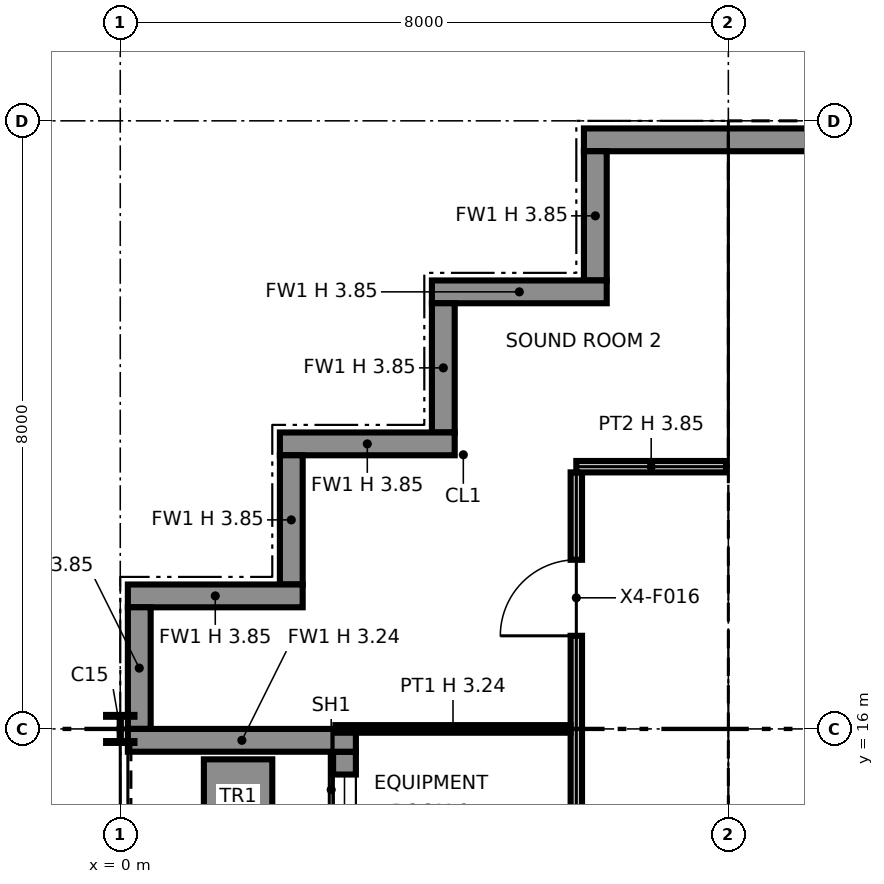
"""IFC4 building model, lengths in metres.
Left out: names, types, materials, properties, quantities, classifications, styles, units other than length and angle.
Written with IfcOpenShell. Run it as: python <this file> out.ifc"""

import sys

from ifc_helpers import new_model, si_unit, direction, frame, frame_2d, origin, origin_2d, place, context, subcontext, project, spatial, polyline, rectangle, i_section, outline, extrude, element, fill, save


model = new_model("IFC4")
c1 = context("Model", 3, precision=1e-05, world=origin(), true_north=direction((0.0, 1.0)))
c2 = subcontext(c1, "Body", "Model", "MODEL_VIEW")
j1 = project(units=[si_unit("LENGTHUNIT", "METRE"), si_unit("PLANEANGLEUNIT", "RADIAN")], contexts=[c1])
p1 = place(None, origin())
s1 = spatial("IfcSite", under=j1, at=p1, CompositionType="ELEMENT")
p2 = place(p1, origin())
s2 = spatial("IfcBuilding", under=s1, at=p2, CompositionType="ELEMENT")
p3 = place(p2, frame((0.0, 0.0, 279.0)))
s3 = spatial("IfcBuildingStorey", under=s2, at=p3, CompositionType="ELEMENT", Elevation=279.0)
p4 = place(p3, frame((0.0, 16.0, 0.0), z_axis=(0.0, 0.0, 1.0), x_axis=(1.0, 0.0, 0.0)))
e1 = element("IfcColumn", 1, at=p4, inside=s3, PredefinedType="COLUMN", context=c2, shape_type="SweptSolid", body=[
    extrude(i_section(OverallWidth=0.373, OverallDepth=0.368, WebThickness=0.015, FlangeThickness=0.024, at=origin_2d()), origin(), (0.0, 0.0, 1.0), 3.85),
])
p5 = place(p3, frame((8.0, 16.0, 0.0), z_axis=(0.0, 0.0, 1.0), x_axis=(1.0, 0.0, 0.0)))
e2 = element("IfcColumn", 2, at=p5, inside=s3, PredefinedType="COLUMN", context=c2, shape_type="SweptSolid", body=[
    extrude(i_section(OverallWidth=0.257, OverallDepth=0.363, WebThickness=0.013, FlangeThickness=0.022, at=origin_2d()), origin(), (0.0, 0.0, 1.0), 3.85),
])
p6 = place(p3, frame((8.0, 24.0, 0.0), z_axis=(0.0, 0.0, 1.0), x_axis=(1.0, 0.0, 0.0)))
e3 = element("IfcColumn", 3, at=p6, inside=s3, PredefinedType="COLUMN", context=c2, shape_type="SweptSolid", body=[
    extrude(i_section(OverallWidth=0.399, OverallDepth=0.386, WebThickness=0.021, FlangeThickness=0.033, at=origin_2d()), origin(), (0.0, 0.0, 1.0), 3.85),
])
p7 = place(p3, frame((32.0, 23.75, 0.0), z_axis=(0.0, 0.0, 1.0), x_axis=(-1.0, 0.0, 0.0)))
e4 = element("IfcWall", 4, at=p7, inside=s3, PredefinedType="SOLIDWALL", context=c2, shape_type="SweptSolid", body=[
    extrude(rectangle(XDim=25.9, YDim=0.3, at=frame_2d((12.95, 0.0))), origin(), (0.0, 0.0, 1.0), 3.85),
])
p8 = place(p3, frame((6.25, 23.6, 0.0), z_axis=(0.0, 0.0, 1.0), x_axis=(0.0, -1.0, 0.0)))
e5 = element("IfcWall", 5, at=p8, inside=s3, PredefinedType="SOLIDWALL", context=c2, shape_type="SweptSolid", body=[
    extrude(rectangle(XDim=1.7, YDim=0.3, at=frame_2d((0.85, 0.0))), origin(), (0.0, 0.0, 1.0), 3.85),
])
p9 = place(p3, frame((6.4, 21.75, 0.0), z_axis=(0.0, 0.0, 1.0), x_axis=(-1.0, 0.0, 0.0)))
e6 = element("IfcWall", 6, at=p9, inside=s3, PredefinedType="SOLIDWALL", context=c2, shape_type="SweptSolid", body=[
    extrude(rectangle(XDim=2.3, YDim=0.3, at=frame_2d((1.15, 0.0))), origin(), (0.0, 0.0, 1.0), 3.85),
])
p10 = place(p3, frame((4.25, 21.6, 0.0), z_axis=(0.0, 0.0, 1.0), x_axis=(0.0, -1.0, 0.0)))
e7 = element("IfcWall", 7, at=p10, inside=s3, PredefinedType="SOLIDWALL", context=c2, shape_type="SweptSolid", body=[
    extrude(rectangle(XDim=1.7, YDim=0.3, at=frame_2d((0.85, 0.0))), origin(), (0.0, 0.0, 1.0), 3.85),
])
p11 = place(p3, frame((4.4, 19.75, 0.0), z_axis=(0.0, 0.0, 1.0), x_axis=(-1.0, 0.0, 0.0)))
e8 = element("IfcWall", 8, at=p11, inside=s3, PredefinedType="SOLIDWALL", context=c2, shape_type="SweptSolid", body=[
    extrude(rectangle(XDim=2.3, YDim=0.3, at=frame_2d((1.15, 0.0))), origin(), (0.0, 0.0, 1.0), 3.85),
])
p12 = place(p3, frame((2.25, 19.6, 0.0), z_axis=(0.0, 0.0, 1.0), x_axis=(0.0, -1.0, 0.0)))
e9 = element("IfcWall", 9, at=p12, inside=s3, PredefinedType="SOLIDWALL", context=c2, shape_type="SweptSolid", body=[
    extrude(rectangle(XDim=1.7, YDim=0.3, at=frame_2d((0.85, 0.0))), origin(), (0.0, 0.0, 1.0), 3.85),
])
p13 = place(p3, frame((2.4, 17.75, 0.0), z_axis=(0.0, 0.0, 1.0), x_axis=(-1.0, 0.0, 0.0)))
e10 = element("IfcWall", 10, at=p13, inside=s3, PredefinedType="SOLIDWALL", context=c2, shape_type="SweptSolid", body=[
    extrude(rectangle(XDim=2.3, YDim=0.3, at=frame_2d((1.15, 0.0))), origin(), (0.0, 0.0, 1.0), 3.85),
])
p14 = place(p3, frame((0.25, 17.6, 0.0), z_axis=(0.0, 0.0, 1.0), x_axis=(0.0, -1.0, 0.0)))
e11 = element("IfcWall", 11, at=p14, inside=s3, PredefinedType="SOLIDWALL", context=c2, shape_type="SweptSolid", body=[
    extrude(rectangle(XDim=1.6, YDim=0.3, at=frame_2d((0.8, 0.0))), origin(), (0.0, 0.0, 1.0), 3.85),
])
p15 = place(p3, frame((2.95, 15.7, 0.0), z_axis=(0.0, 0.0, 1.0), x_axis=(0.0, -1.0, 0.0)))
e12 = element("IfcWall", 12, at=p15, inside=s3, PredefinedType="SOLIDWALL", context=c2, shape_type="SweptSolid", body=[
    extrude(rectangle(XDim=7.4, YDim=0.3, at=frame_2d((3.7, 0.0))), origin(), (0.0, 0.0, 1.0), 3.85),
])
p16 = place(p15, frame((0.3, 0.0, 0.9)))
e13 = element("IfcOpeningElement", 13, at=p16, cuts=e12, PredefinedType="OPENING", context=c2, shape_type="SweptSolid", body=[
    extrude(rectangle(XDim=2.8, YDim=2.2, at=frame_2d((1.4, 1.1))), frame((0.0, 0.16, 0.0), z_axis=(0.0, -1.0, 0.0), x_axis=(1.0, 0.0, 0.0)), (0.0, 0.0, 1.0), 0.32),
])
p17 = place(p15, frame((4.7, 0.0, 0.0)))
e14 = element("IfcOpeningElement", 14, at=p17, cuts=e12, PredefinedType="OPENING", context=c2, shape_type="SweptSolid", body=[
    extrude(rectangle(XDim=2.0, YDim=2.4, at=frame_2d((1.0, 1.2))), frame((0.0, 0.16, 0.0), z_axis=(0.0, -1.0, 0.0), x_axis=(1.0, 0.0, 0.0)), (0.0, 0.0, 1.0), 0.32),
])
p18 = place(p3, frame((0.1, 15.85, 0.0), z_axis=(0.0, 0.0, 1.0), x_axis=(1.0, 0.0, 0.0)))
e15 = element("IfcWall", 15, at=p18, inside=s3, PredefinedType="SOLIDWALL", context=c2, shape_type="SweptSolid", body=[
    extrude(rectangle(XDim=3.0, YDim=0.3, at=frame_2d((1.5, 0.0))), origin(), (0.0, 0.0, 1.0), 3.237),
])
p19 = place(p3, frame((1.55, 15.6, 0.0), z_axis=(0.0, 0.0, 1.0), x_axis=(0.0, -1.0, 0.0)))
e16 = element("IfcWall", 16, at=p19, inside=s3, PredefinedType="SOLIDWALL", context=c2, shape_type="SweptSolid", body=[
    extrude(rectangle(XDim=3.2, YDim=0.9, at=frame_2d((1.6, 0.0))), origin(), (0.0, 0.0, 1.0), 0.6),
])
p20 = place(p3, frame((8.75, 8.85, 0.0), z_axis=(0.0, 0.0, 1.0), x_axis=(0.0, 1.0, 0.0)))
e17 = element("IfcWall", 17, at=p20, inside=s3, PredefinedType="PARTITIONING", context=c2, shape_type="SweptSolid", body=[
    extrude(outline(polyline([(0.0, 0.0), (14.3, 0.0), (14.3, 3.85), (10.225, 3.85), (10.224, 3.44), (10.076, 3.44), (10.075, 3.85), (7.238, 3.85), (7.237, 3.318), (7.063, 3.318), (7.062, 3.85), (0.0, 3.85), (0.0, 0.0)])), frame((0.0, 0.1, 0.0), z_axis=(0.0, -1.0, 0.0), x_axis=(1.0, 0.0, 0.0)), (0.0, 0.0, 1.0), 0.2),
])
p21 = place(p20, frame((8.3, 0.0, 0.0)))
e18 = element("IfcOpeningElement", 18, at=p21, cuts=e17, PredefinedType="OPENING", context=c2, shape_type="SweptSolid", body=[
    extrude(rectangle(XDim=1.8, YDim=2.1, at=frame_2d((0.9, 1.05))), frame((0.0, 0.11, 0.0), z_axis=(0.0, -1.0, 0.0), x_axis=(1.0, 0.0, 0.0)), (0.0, 0.0, 1.0), 0.22),
])
p22 = place(p3, frame((8.65, 23.25, 0.0), z_axis=(0.0, 0.0, 1.0), x_axis=(1.0, 0.0, 0.0)))
e19 = element("IfcWall", 19, at=p22, inside=s3, PredefinedType="PARTITIONING", context=c2, shape_type="SweptSolid", body=[
    extrude(outline(polyline([(0.0, 0.0), (14.7, 0.0), (14.7, 3.85), (7.438, 3.85), (7.437, 3.318), (7.263, 3.318), (7.262, 3.85), (0.0, 3.85), (0.0, 0.0)])), frame((0.0, 0.1, 0.0), z_axis=(0.0, -1.0, 0.0), x_axis=(1.0, 0.0, 0.0)), (0.0, 0.0, 1.0), 0.2),
])
p23 = place(p3, frame((8.85, 16.0, 0.0), z_axis=(0.0, 0.0, 1.0), x_axis=(1.0, 0.0, 0.0)))
e20 = element("IfcWall", 20, at=p23, inside=s3, PredefinedType="PARTITIONING", context=c2, shape_type="SweptSolid", body=[
    extrude(rectangle(XDim=6.958, YDim=0.6, at=frame_2d((3.479, 0.0))), origin(), (0.0, 0.0, 1.0), 3.318),
])
p24 = place(p3, frame((8.85, 19.9, 0.0), z_axis=(0.0, 0.0, 1.0), x_axis=(1.0, 0.0, 0.0)))
e21 = element("IfcWall", 21, at=p24, inside=s3, PredefinedType="PARTITIONING", context=c2, shape_type="SweptSolid", body=[
    extrude(outline(polyline([(0.0, 0.0), (14.3, 0.0), (14.3, 3.85), (7.238, 3.85), (7.237, 3.318), (7.063, 3.318), (7.062, 3.85), (0.0, 3.85), (0.0, 0.0)])), frame((0.0, 0.1, 0.0), z_axis=(0.0, -1.0, 0.0), x_axis=(1.0, 0.0, 0.0)), (0.0, 0.0, 1.0), 0.2),
])
p25 = place(p24, frame((2.125, 0.0, 0.0)))
e22 = element("IfcOpeningElement", 22, at=p25, cuts=e21, PredefinedType="OPENING", context=c2, shape_type="SweptSolid", body=[
    extrude(rectangle(XDim=0.9, YDim=2.1, at=frame_2d((0.45, 1.05))), frame((0.0, 0.11, 0.0), z_axis=(0.0, -1.0, 0.0), x_axis=(1.0, 0.0, 0.0)), (0.0, 0.0, 1.0), 0.22),
])
p26 = place(p24, frame((5.65, 0.0, 0.0)))
e23 = element("IfcOpeningElement", 23, at=p26, cuts=e21, PredefinedType="OPENING", context=c2, shape_type="SweptSolid", body=[
    extrude(rectangle(XDim=1.1, YDim=2.1, at=frame_2d((0.55, 1.05))), frame((0.0, 0.11, 0.0), z_axis=(0.0, -1.0, 0.0), x_axis=(1.0, 0.0, 0.0)), (0.0, 0.0, 1.0), 0.22),
])
p27 = place(p24, frame((7.95, 0.0, 0.0)))
e24 = element("IfcOpeningElement", 24, at=p27, cuts=e21, PredefinedType="OPENING", context=c2, shape_type="SweptSolid", body=[
    extrude(rectangle(XDim=1.1, YDim=2.1, at=frame_2d((0.55, 1.05))), frame((0.0, 0.11, 0.0), z_axis=(0.0, -1.0, 0.0), x_axis=(1.0, 0.0, 0.0)), (0.0, 0.0, 1.0), 0.22),
])
p28 = place(p24, frame((10.25, 0.0, 0.0)))
e25 = element("IfcOpeningElement", 25, at=p28, cuts=e21, PredefinedType="OPENING", context=c2, shape_type="SweptSolid", body=[
    extrude(rectangle(XDim=1.1, YDim=2.1, at=frame_2d((0.55, 1.05))), frame((0.0, 0.11, 0.0), z_axis=(0.0, -1.0, 0.0), x_axis=(1.0, 0.0, 0.0)), (0.0, 0.0, 1.0), 0.22),
])
p29 = place(p24, frame((12.625, 0.0, 0.0)))
e26 = element("IfcOpeningElement", 26, at=p29, cuts=e21, PredefinedType="OPENING", context=c2, shape_type="SweptSolid", body=[
    extrude(rectangle(XDim=1.1, YDim=2.1, at=frame_2d((0.55, 1.05))), frame((0.0, 0.11, 0.0), z_axis=(0.0, -1.0, 0.0), x_axis=(1.0, 0.0, 0.0)), (0.0, 0.0, 1.0), 0.22),
])
p30 = place(p3, frame((6.0, 6.0, 0.0), z_axis=(0.0, 0.0, 1.0), x_axis=(0.0, 1.0, 0.0)))
e27 = element("IfcWall", 27, at=p30, inside=s3, PredefinedType="PARTITIONING", context=c2, shape_type="SweptSolid", body=[
    extrude(outline(polyline([(0.0, 0.0), (13.375, 0.0), (13.375, 3.85), (10.3, 3.85), (10.298, 3.238), (9.702, 3.238), (9.7, 3.85), (6.3, 3.85), (6.298, 3.238), (5.702, 3.238), (5.7, 3.85), (2.3, 3.85), (2.298, 3.238), (1.702, 3.238), (1.7, 3.85), (0.0, 3.85), (0.0, 0.0)])), frame((0.0, 0.075, 0.0), z_axis=(0.0, -1.0, 0.0), x_axis=(1.0, 0.0, 0.0)), (0.0, 0.0, 1.0), 0.15),
])
p31 = place(p30, frame((0.5, 0.0, 0.0)))
e28 = element("IfcOpeningElement", 28, at=p31, cuts=e27, PredefinedType="OPENING", context=c2, shape_type="SweptSolid", body=[
    extrude(rectangle(XDim=1.0, YDim=2.1, at=frame_2d((0.5, 1.05))), frame((0.0, 0.085, 0.0), z_axis=(0.0, -1.0, 0.0), x_axis=(1.0, 0.0, 0.0)), (0.0, 0.0, 1.0), 0.17),
])
p32 = place(p30, frame((3.5, 0.0, 0.0)))
e29 = element("IfcOpeningElement", 29, at=p32, cuts=e27, PredefinedType="OPENING", context=c2, shape_type="SweptSolid", body=[
    extrude(rectangle(XDim=1.0, YDim=2.1, at=frame_2d((0.5, 1.05))), frame((0.0, 0.085, 0.0), z_axis=(0.0, -1.0, 0.0), x_axis=(1.0, 0.0, 0.0)), (0.0, 0.0, 1.0), 0.17),
])
p33 = place(p30, frame((7.5, 0.0, 0.0)))
e30 = element("IfcOpeningElement", 30, at=p33, cuts=e27, PredefinedType="OPENING", context=c2, shape_type="SweptSolid", body=[
    extrude(rectangle(XDim=1.0, YDim=2.1, at=frame_2d((0.5, 1.05))), frame((0.0, 0.085, 0.0), z_axis=(0.0, -1.0, 0.0), x_axis=(1.0, 0.0, 0.0)), (0.0, 0.0, 1.0), 0.17),
])
p34 = place(p30, frame((11.225, 0.0, 0.0)))
e31 = element("IfcOpeningElement", 31, at=p34, cuts=e27, PredefinedType="OPENING", context=c2, shape_type="SweptSolid", body=[
    extrude(rectangle(XDim=1.0, YDim=2.1, at=frame_2d((0.5, 1.05))), frame((0.0, 0.085, 0.0), z_axis=(0.0, -1.0, 0.0), x_axis=(1.0, 0.0, 0.0)), (0.0, 0.0, 1.0), 0.17),
])
p35 = place(p3, frame((2.83, 16.0, 0.0), z_axis=(0.0, 0.0, 1.0), x_axis=(1.0, 0.0, 0.0)))
e32 = element("IfcWall", 32, at=p35, inside=s3, PredefinedType="PARTITIONING", context=c2, shape_type="SweptSolid", body=[
    extrude(rectangle(XDim=3.095, YDim=0.1, at=frame_2d((1.547, 0.0))), origin(), (0.0, 0.0, 1.0), 3.238),
])
p36 = place(p3, frame((6.0, 19.45, 0.0), z_axis=(0.0, 0.0, 1.0), x_axis=(1.0, 0.0, 0.0)))
e33 = element("IfcWall", 33, at=p36, inside=s3, PredefinedType="PARTITIONING", context=c2, shape_type="SweptSolid", body=[
    extrude(rectangle(XDim=1.97, YDim=0.15, at=frame_2d((0.985, 0.0))), origin(), (0.0, 0.0, 1.0), 3.85),
])
p37 = place(p16, origin())
e34 = element("IfcWindow", 34, at=p37, inside=s3, PartitioningType="SINGLE_PANEL", PredefinedType="WINDOW", context=c2, shape_type="SweptSolid", body=[
    extrude(rectangle(XDim=2.8, YDim=2.2, at=frame_2d((1.4, 1.1))), frame((0.0, 0.03, 0.0), z_axis=(0.0, -1.0, 0.0), x_axis=(1.0, 0.0, 0.0)), (0.0, 0.0, 1.0), 0.06),
])
fill(e13, e34)
p38 = place(p21, origin())
e35 = element("IfcDoor", 35, at=p38, inside=s3, OperationType="DOUBLE_DOOR_SINGLE_SWING", PredefinedType="NOTDEFINED", context=c2, shape_type="SweptSolid", body=[
    extrude(rectangle(XDim=1.8, YDim=2.1, at=frame_2d((0.9, 1.05))), frame((0.0, 0.025, 0.0), z_axis=(0.0, -1.0, 0.0), x_axis=(1.0, 0.0, 0.0)), (0.0, 0.0, 1.0), 0.05),
])
fill(e18, e35)
p39 = place(p34, origin())
e36 = element("IfcDoor", 36, at=p39, inside=s3, OperationType="SINGLE_SWING_LEFT", PredefinedType="DOOR", context=c2, shape_type="SweptSolid", body=[
    extrude(rectangle(XDim=1.0, YDim=2.1, at=frame_2d((0.5, 1.05))), frame((0.0, 0.025, 0.0), z_axis=(0.0, -1.0, 0.0), x_axis=(1.0, 0.0, 0.0)), (0.0, 0.0, 1.0), 0.05),
])
fill(e31, e36)
save(model, sys.argv[1])
